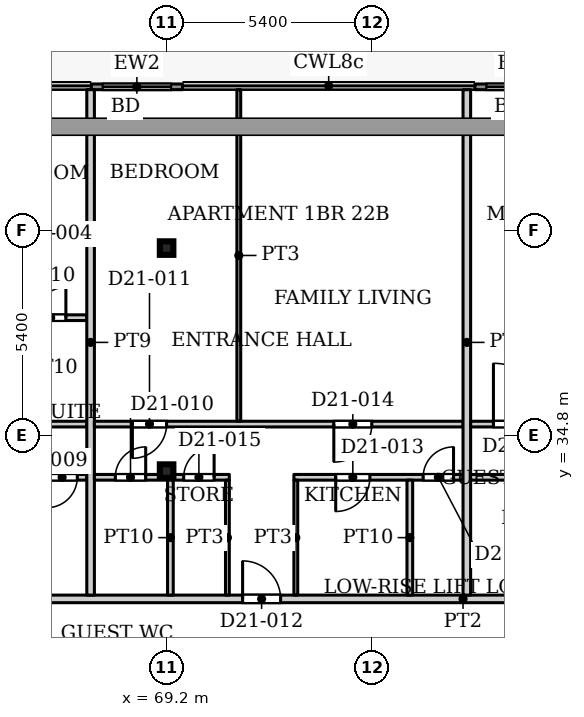
"""IFC4 building model, lengths in metres.
Left out: names, types, materials, properties, quantities, classifications, styles, units other than length and angle.
Written with IfcOpenShell. Run it as: python <this file> out.ifc"""

import sys

from ifc_helpers import new_model, si_unit, direction, frame, frame_2d, origin, origin_2d, place, context, subcontext, project, spatial, rectangle, hollow_rectangle, extrude, source, transform, mapped, element, fill, save


model = new_model("IFC4")
c1 = context("Model", 3, precision=1e-05, world=origin(), true_north=direction((0.0, 1.0)))
c2 = subcontext(c1, "Body", "Model", "MODEL_VIEW")
j1 = project(units=[si_unit("LENGTHUNIT", "METRE"), si_unit("PLANEANGLEUNIT", "RADIAN")], contexts=[c1])
p1 = place(None, origin())
s1 = spatial("IfcSite", under=j1, at=p1, CompositionType="ELEMENT")
p2 = place(p1, origin())
s2 = spatial("IfcBuilding", under=s1, at=p2, CompositionType="ELEMENT")
p3 = place(p2, frame((0.0, 0.0, 98.0)))
s3 = spatial("IfcBuildingStorey", under=s2, at=p3, CompositionType="ELEMENT", Elevation=98.0)
for number, where, z_axis, x_axis in (
    (1, (69.2, 33.863, 0.0), (0.0, 0.0, 1.0), (1.0, 0.0, 0.0)),
    (2, (69.2, 39.732, 0.0), (0.0, 0.0, 1.0), (1.0, 0.0, 0.0)),
):
    element("IfcColumn", number, at=place(p3, frame(where, z_axis=z_axis, x_axis=x_axis)), inside=s3, PredefinedType="COLUMN", context=c2, shape_type="SweptSolid", body=[
        extrude(hollow_rectangle(XDim=0.356, YDim=0.356, WallThickness=0.016, InnerFilletRadius=0.016, OuterFilletRadius=0.032, at=origin_2d()), origin(), (0.0, 0.0, 1.0), 3.9),
    ])
p4 = place(p3, frame((67.218, 43.975, 0.0), z_axis=(0.0, 0.0, 1.0), x_axis=(1.0, 0.0, 0.0)))
e3 = element("IfcWall", 3, at=p4, inside=s3, PredefinedType="SOLIDWALL", context=c2, shape_type="SweptSolid", body=[
    extrude(rectangle(XDim=2.4, YDim=0.15, at=frame_2d((1.2, 0.0))), origin(), (0.0, 0.0, 1.0), 3.75),
])
p5 = place(p4, frame((0.3, 0.0, 0.0)))
e4 = element("IfcOpeningElement", 4, at=p5, cuts=e3, PredefinedType="OPENING", context=c2, shape_type="SweptSolid", body=[
    extrude(rectangle(XDim=1.8, YDim=2.4, at=frame_2d((0.9, 1.2))), frame((0.0, 0.085, 0.0), z_axis=(0.0, -1.0, 0.0), x_axis=(1.0, 0.0, 0.0)), (0.0, 0.0, 1.0), 0.17),
])
p6 = place(p3, frame((77.312, 43.975, 0.0), z_axis=(0.0, 0.0, 1.0), x_axis=(1.0, 0.0, 0.0)))
e5 = element("IfcWall", 5, at=p6, inside=s3, PredefinedType="SOLIDWALL", context=c2, shape_type="SweptSolid", body=[
    extrude(rectangle(XDim=2.4, YDim=0.15, at=frame_2d((1.2, 0.0))), origin(), (0.0, 0.0, 1.0), 3.75),
])
p7 = place(p6, frame((0.3, 0.0, 0.0)))
e6 = element("IfcOpeningElement", 6, at=p7, cuts=e5, PredefinedType="OPENING", context=c2, shape_type="SweptSolid", body=[
    extrude(rectangle(XDim=1.8, YDim=2.4, at=frame_2d((0.9, 1.2))), frame((0.0, 0.085, 0.0), z_axis=(0.0, -1.0, 0.0), x_axis=(1.0, 0.0, 0.0)), (0.0, 0.0, 1.0), 0.17),
])
p8 = place(p3, frame((55.9, 30.5, 0.0), z_axis=(0.0, 0.0, 1.0), x_axis=(1.0, 0.0, 0.0)))
e7 = element("IfcWall", 7, at=p8, inside=s3, PredefinedType="PARTITIONING", context=c2, shape_type="SweptSolid", body=[
    extrude(rectangle(XDim=42.2, YDim=0.2, at=frame_2d((21.1, 0.0))), origin(), (0.0, 0.0, 1.0), 3.6),
])
p9 = place(p8, frame((2.7, 0.0, 0.0)))
e8 = element("IfcOpeningElement", 8, at=p9, cuts=e7, PredefinedType="OPENING", context=c2, shape_type="SweptSolid", body=[
    extrude(rectangle(XDim=1.0, YDim=2.1, at=frame_2d((0.5, 1.05))), frame((0.0, 0.11, 0.0), z_axis=(0.0, -1.0, 0.0), x_axis=(1.0, 0.0, 0.0)), (0.0, 0.0, 1.0), 0.22),
])
p10 = place(p8, frame((15.3, 0.0, 0.0)))
e9 = element("IfcOpeningElement", 9, at=p10, cuts=e7, PredefinedType="OPENING", context=c2, shape_type="SweptSolid", body=[
    extrude(rectangle(XDim=1.0, YDim=2.1, at=frame_2d((0.5, 1.05))), frame((0.0, 0.11, 0.0), z_axis=(0.0, -1.0, 0.0), x_axis=(1.0, 0.0, 0.0)), (0.0, 0.0, 1.0), 0.22),
])
p11 = place(p8, frame((33.3, 0.0, 0.0)))
e10 = element("IfcOpeningElement", 10, at=p11, cuts=e7, PredefinedType="OPENING", context=c2, shape_type="SweptSolid", body=[
    extrude(rectangle(XDim=1.0, YDim=2.1, at=frame_2d((0.5, 1.05))), frame((0.0, 0.11, 0.0), z_axis=(0.0, -1.0, 0.0), x_axis=(1.0, 0.0, 0.0)), (0.0, 0.0, 1.0), 0.22),
])
p12 = place(p3, frame((55.9, 35.1, 0.0), z_axis=(0.0, 0.0, 1.0), x_axis=(1.0, 0.0, 0.0)))
e11 = element("IfcWall", 11, at=p12, inside=s3, PredefinedType="PARTITIONING", context=c2, shape_type="SweptSolid", body=[
    extrude(rectangle(XDim=11.2, YDim=0.15, at=frame_2d((5.6, 0.0))), origin(), (0.0, 0.0, 1.0), 3.6),
])
p13 = place(p12, frame((1.4, 0.0, 0.0)))
e12 = element("IfcOpeningElement", 12, at=p13, cuts=e11, PredefinedType="OPENING", context=c2, shape_type="SweptSolid", body=[
    extrude(rectangle(XDim=0.9, YDim=2.1, at=frame_2d((0.45, 1.05))), frame((0.0, 0.085, 0.0), z_axis=(0.0, -1.0, 0.0), x_axis=(1.0, 0.0, 0.0)), (0.0, 0.0, 1.0), 0.17),
])
p14 = place(p12, frame((5.1, 0.0, 0.0)))
e13 = element("IfcOpeningElement", 13, at=p14, cuts=e11, PredefinedType="OPENING", context=c2, shape_type="SweptSolid", body=[
    extrude(rectangle(XDim=1.0, YDim=2.1, at=frame_2d((0.5, 1.05))), frame((0.0, 0.085, 0.0), z_axis=(0.0, -1.0, 0.0), x_axis=(1.0, 0.0, 0.0)), (0.0, 0.0, 1.0), 0.17),
])
p15 = place(p12, frame((7.85, 0.0, 0.0)))
e14 = element("IfcOpeningElement", 14, at=p15, cuts=e11, PredefinedType="OPENING", context=c2, shape_type="SweptSolid", body=[
    extrude(rectangle(XDim=0.9, YDim=2.1, at=frame_2d((0.45, 1.05))), frame((0.0, 0.085, 0.0), z_axis=(0.0, -1.0, 0.0), x_axis=(1.0, 0.0, 0.0)), (0.0, 0.0, 1.0), 0.17),
])
p16 = place(p3, frame((59.95, 33.7, 0.0), z_axis=(0.0, 0.0, 1.0), x_axis=(1.0, 0.0, 0.0)))
e15 = element("IfcWall", 15, at=p16, inside=s3, PredefinedType="PARTITIONING", context=c2, shape_type="SweptSolid", body=[
    extrude(rectangle(XDim=7.15, YDim=0.15, at=frame_2d((3.575, 0.0))), origin(), (0.0, 0.0, 1.0), 3.6),
])
p17 = place(p16, frame((4.15, 0.0, 0.0)))
e16 = element("IfcOpeningElement", 16, at=p17, cuts=e15, PredefinedType="OPENING", context=c2, shape_type="SweptSolid", body=[
    extrude(rectangle(XDim=0.8, YDim=2.1, at=frame_2d((0.4, 1.05))), frame((0.0, 0.085, 0.0), z_axis=(0.0, -1.0, 0.0), x_axis=(1.0, 0.0, 0.0)), (0.0, 0.0, 1.0), 0.17),
])
p18 = place(p16, frame((1.25, 0.0, 0.0)))
e17 = element("IfcOpeningElement", 17, at=p18, cuts=e15, PredefinedType="OPENING", context=c2, shape_type="SweptSolid", body=[
    extrude(rectangle(XDim=0.9, YDim=2.1, at=frame_2d((0.45, 1.05))), frame((0.0, 0.085, 0.0), z_axis=(0.0, -1.0, 0.0), x_axis=(1.0, 0.0, 0.0)), (0.0, 0.0, 1.0), 0.17),
])
p19 = place(p16, frame((6.1, 0.0, 0.0)))
e18 = element("IfcOpeningElement", 18, at=p19, cuts=e15, PredefinedType="OPENING", context=c2, shape_type="SweptSolid", body=[
    extrude(rectangle(XDim=0.8, YDim=2.1, at=frame_2d((0.4, 1.05))), frame((0.0, 0.085, 0.0), z_axis=(0.0, -1.0, 0.0), x_axis=(1.0, 0.0, 0.0)), (0.0, 0.0, 1.0), 0.17),
])
p20 = place(p3, frame((65.175, 37.9, 0.0), z_axis=(0.0, 0.0, 1.0), x_axis=(1.0, 0.0, 0.0)))
e19 = element("IfcWall", 19, at=p20, inside=s3, PredefinedType="PARTITIONING", context=c2, shape_type="SweptSolid", body=[
    extrude(rectangle(XDim=1.925, YDim=0.15, at=frame_2d((0.962, 0.0))), origin(), (0.0, 0.0, 1.0), 3.6),
])
p21 = place(p20, frame((0.575, 0.0, 0.0)))
e20 = element("IfcOpeningElement", 20, at=p21, cuts=e19, PredefinedType="OPENING", context=c2, shape_type="SweptSolid", body=[
    extrude(rectangle(XDim=0.8, YDim=2.1, at=frame_2d((0.4, 1.05))), frame((0.0, 0.085, 0.0), z_axis=(0.0, -1.0, 0.0), x_axis=(1.0, 0.0, 0.0)), (0.0, 0.0, 1.0), 0.17),
])
p22 = place(p3, frame((67.2, 30.6, 0.0), z_axis=(0.0, 0.0, 1.0), x_axis=(0.0, 1.0, 0.0)))
e21 = element("IfcWall", 21, at=p22, inside=s3, PredefinedType="PARTITIONING", context=c2, shape_type="SweptSolid", body=[
    extrude(rectangle(XDim=13.3, YDim=0.2, at=frame_2d((6.65, 0.0))), origin(), (0.0, 0.0, 1.0), 3.6),
])
p23 = place(p3, frame((67.3, 33.7, 0.0), z_axis=(0.0, 0.0, 1.0), x_axis=(1.0, 0.0, 0.0)))
e22 = element("IfcWall", 22, at=p23, inside=s3, PredefinedType="PARTITIONING", context=c2, shape_type="SweptSolid", body=[
    extrude(rectangle(XDim=3.55, YDim=0.15, at=frame_2d((1.775, 0.0))), origin(), (0.0, 0.0, 1.0), 3.6),
])
p24 = place(p23, frame((0.55, 0.0, 0.0)))
e23 = element("IfcOpeningElement", 23, at=p24, cuts=e22, PredefinedType="OPENING", context=c2, shape_type="SweptSolid", body=[
    extrude(rectangle(XDim=0.8, YDim=2.1, at=frame_2d((0.4, 1.05))), frame((0.0, 0.085, 0.0), z_axis=(0.0, -1.0, 0.0), x_axis=(1.0, 0.0, 0.0)), (0.0, 0.0, 1.0), 0.17),
])
p25 = place(p23, frame((2.35, 0.0, 0.0)))
e24 = element("IfcOpeningElement", 24, at=p25, cuts=e22, PredefinedType="OPENING", context=c2, shape_type="SweptSolid", body=[
    extrude(rectangle(XDim=0.8, YDim=2.1, at=frame_2d((0.4, 1.05))), frame((0.0, 0.085, 0.0), z_axis=(0.0, -1.0, 0.0), x_axis=(1.0, 0.0, 0.0)), (0.0, 0.0, 1.0), 0.17),
])
p26 = place(p3, frame((67.3, 35.1, 0.0), z_axis=(0.0, 0.0, 1.0), x_axis=(1.0, 0.0, 0.0)))
e25 = element("IfcWall", 25, at=p26, inside=s3, PredefinedType="PARTITIONING", context=c2, shape_type="SweptSolid", body=[
    extrude(rectangle(XDim=9.7, YDim=0.15, at=frame_2d((4.85, 0.0))), origin(), (0.0, 0.0, 1.0), 3.6),
])
p27 = place(p26, frame((1.0, 0.0, 0.0)))
e26 = element("IfcOpeningElement", 26, at=p27, cuts=e25, PredefinedType="OPENING", context=c2, shape_type="SweptSolid", body=[
    extrude(rectangle(XDim=0.9, YDim=2.1, at=frame_2d((0.45, 1.05))), frame((0.0, 0.085, 0.0), z_axis=(0.0, -1.0, 0.0), x_axis=(1.0, 0.0, 0.0)), (0.0, 0.0, 1.0), 0.17),
])
p28 = place(p26, frame((6.3, 0.0, 0.0)))
e27 = element("IfcOpeningElement", 27, at=p28, cuts=e25, PredefinedType="OPENING", context=c2, shape_type="SweptSolid", body=[
    extrude(rectangle(XDim=1.0, YDim=2.1, at=frame_2d((0.5, 1.05))), frame((0.0, 0.085, 0.0), z_axis=(0.0, -1.0, 0.0), x_axis=(1.0, 0.0, 0.0)), (0.0, 0.0, 1.0), 0.17),
])
p29 = place(p3, frame((69.3, 30.6, 0.0), z_axis=(0.0, 0.0, 1.0), x_axis=(0.0, 1.0, 0.0)))
e28 = element("IfcWall", 28, at=p29, inside=s3, PredefinedType="PARTITIONING", context=c2, shape_type="SweptSolid", body=[
    extrude(rectangle(XDim=3.025, YDim=0.15, at=frame_2d((1.512, 0.0))), origin(), (0.0, 0.0, 1.0), 3.6),
])
p30 = place(p3, frame((70.8, 30.6, 0.0), z_axis=(0.0, 0.0, 1.0), x_axis=(0.0, 1.0, 0.0)))
e29 = element("IfcWall", 29, at=p30, inside=s3, PredefinedType="PARTITIONING", context=c2, shape_type="SweptSolid", body=[
    extrude(rectangle(XDim=3.025, YDim=0.1, at=frame_2d((1.512, 0.0))), origin(), (0.0, 0.0, 1.0), 3.6),
])
p31 = place(p3, frame((71.1, 35.175, 0.0), z_axis=(0.0, 0.0, 1.0), x_axis=(0.0, 1.0, 0.0)))
e30 = element("IfcWall", 30, at=p31, inside=s3, PredefinedType="PARTITIONING", context=c2, shape_type="SweptSolid", body=[
    extrude(rectangle(XDim=8.725, YDim=0.1, at=frame_2d((4.362, 0.0))), origin(), (0.0, 0.0, 1.0), 3.6),
])
p32 = place(p3, frame((72.55, 33.7, 0.0), z_axis=(0.0, 0.0, 1.0), x_axis=(1.0, 0.0, 0.0)))
e31 = element("IfcWall", 31, at=p32, inside=s3, PredefinedType="PARTITIONING", context=c2, shape_type="SweptSolid", body=[
    extrude(rectangle(XDim=4.45, YDim=0.15, at=frame_2d((2.225, 0.0))), origin(), (0.0, 0.0, 1.0), 3.6),
])
p33 = place(p32, frame((1.1, 0.0, 0.0)))
e32 = element("IfcOpeningElement", 32, at=p33, cuts=e31, PredefinedType="OPENING", context=c2, shape_type="SweptSolid", body=[
    extrude(rectangle(XDim=0.9, YDim=2.1, at=frame_2d((0.45, 1.05))), frame((0.0, 0.085, 0.0), z_axis=(0.0, -1.0, 0.0), x_axis=(1.0, 0.0, 0.0)), (0.0, 0.0, 1.0), 0.17),
])
p34 = place(p32, frame((3.4, 0.0, 0.0)))
e33 = element("IfcOpeningElement", 33, at=p34, cuts=e31, PredefinedType="OPENING", context=c2, shape_type="SweptSolid", body=[
    extrude(rectangle(XDim=0.8, YDim=2.1, at=frame_2d((0.4, 1.05))), frame((0.0, 0.085, 0.0), z_axis=(0.0, -1.0, 0.0), x_axis=(1.0, 0.0, 0.0)), (0.0, 0.0, 1.0), 0.17),
])
p35 = place(p3, frame((72.6, 30.6, 0.0), z_axis=(0.0, 0.0, 1.0), x_axis=(0.0, 1.0, 0.0)))
e34 = element("IfcWall", 34, at=p35, inside=s3, PredefinedType="PARTITIONING", context=c2, shape_type="SweptSolid", body=[
    extrude(rectangle(XDim=3.025, YDim=0.1, at=frame_2d((1.512, 0.0))), origin(), (0.0, 0.0, 1.0), 3.6),
])
p36 = place(p3, frame((75.6, 30.6, 0.0), z_axis=(0.0, 0.0, 1.0), x_axis=(0.0, 1.0, 0.0)))
e35 = element("IfcWall", 35, at=p36, inside=s3, PredefinedType="PARTITIONING", context=c2, shape_type="SweptSolid", body=[
    extrude(rectangle(XDim=3.025, YDim=0.15, at=frame_2d((1.512, 0.0))), origin(), (0.0, 0.0, 1.0), 3.6),
])
p37 = place(p3, frame((77.1, 30.6, 0.0), z_axis=(0.0, 0.0, 1.0), x_axis=(0.0, 1.0, 0.0)))
e36 = element("IfcWall", 36, at=p37, inside=s3, PredefinedType="PARTITIONING", context=c2, shape_type="SweptSolid", body=[
    extrude(rectangle(XDim=13.3, YDim=0.2, at=frame_2d((6.65, 0.0))), origin(), (0.0, 0.0, 1.0), 3.6),
])
p38 = place(p3, frame((77.2, 33.7, 0.0), z_axis=(0.0, 0.0, 1.0), x_axis=(1.0, 0.0, 0.0)))
e37 = element("IfcWall", 37, at=p38, inside=s3, PredefinedType="PARTITIONING", context=c2, shape_type="SweptSolid", body=[
    extrude(rectangle(XDim=11.375, YDim=0.15, at=frame_2d((5.688, 0.0))), origin(), (0.0, 0.0, 1.0), 3.6),
])
p39 = place(p38, frame((9.4, 0.0, 0.0)))
e38 = element("IfcOpeningElement", 38, at=p39, cuts=e37, PredefinedType="OPENING", context=c2, shape_type="SweptSolid", body=[
    extrude(rectangle(XDim=0.8, YDim=2.1, at=frame_2d((0.4, 1.05))), frame((0.0, 0.085, 0.0), z_axis=(0.0, -1.0, 0.0), x_axis=(1.0, 0.0, 0.0)), (0.0, 0.0, 1.0), 0.17),
])
p40 = place(p38, frame((1.5, 0.0, 0.0)))
e39 = element("IfcOpeningElement", 39, at=p40, cuts=e37, PredefinedType="OPENING", context=c2, shape_type="SweptSolid", body=[
    extrude(rectangle(XDim=0.8, YDim=2.1, at=frame_2d((0.4, 1.05))), frame((0.0, 0.085, 0.0), z_axis=(0.0, -1.0, 0.0), x_axis=(1.0, 0.0, 0.0)), (0.0, 0.0, 1.0), 0.17),
])
p41 = place(p3, frame((77.2, 35.1, 0.0), z_axis=(0.0, 0.0, 1.0), x_axis=(1.0, 0.0, 0.0)))
e40 = element("IfcWall", 40, at=p41, inside=s3, PredefinedType="PARTITIONING", context=c2, shape_type="SweptSolid", body=[
    extrude(rectangle(XDim=22.7, YDim=0.15, at=frame_2d((11.35, 0.0))), origin(), (0.0, 0.0, 1.0), 3.6),
])
p42 = place(p41, frame((4.4, 0.0, 0.0)))
e41 = element("IfcOpeningElement", 41, at=p42, cuts=e40, PredefinedType="OPENING", context=c2, shape_type="SweptSolid", body=[
    extrude(rectangle(XDim=0.9, YDim=2.1, at=frame_2d((0.45, 1.05))), frame((0.0, 0.085, 0.0), z_axis=(0.0, -1.0, 0.0), x_axis=(1.0, 0.0, 0.0)), (0.0, 0.0, 1.0), 0.17),
])
p43 = place(p41, frame((8.3, 0.0, 0.0)))
e42 = element("IfcOpeningElement", 42, at=p43, cuts=e40, PredefinedType="OPENING", context=c2, shape_type="SweptSolid", body=[
    extrude(rectangle(XDim=0.9, YDim=2.1, at=frame_2d((0.45, 1.05))), frame((0.0, 0.085, 0.0), z_axis=(0.0, -1.0, 0.0), x_axis=(1.0, 0.0, 0.0)), (0.0, 0.0, 1.0), 0.17),
])
p44 = place(p41, frame((20.9, 0.0, 0.0)))
e43 = element("IfcOpeningElement", 43, at=p44, cuts=e40, PredefinedType="OPENING", context=c2, shape_type="SweptSolid", body=[
    extrude(rectangle(XDim=0.9, YDim=2.1, at=frame_2d((0.45, 1.05))), frame((0.0, 0.085, 0.0), z_axis=(0.0, -1.0, 0.0), x_axis=(1.0, 0.0, 0.0)), (0.0, 0.0, 1.0), 0.17),
])
p45 = place(p41, frame((17.4, 0.0, 0.0)))
e44 = element("IfcOpeningElement", 44, at=p45, cuts=e40, PredefinedType="OPENING", context=c2, shape_type="SweptSolid", body=[
    extrude(rectangle(XDim=1.0, YDim=2.1, at=frame_2d((0.5, 1.05))), frame((0.0, 0.085, 0.0), z_axis=(0.0, -1.0, 0.0), x_axis=(1.0, 0.0, 0.0)), (0.0, 0.0, 1.0), 0.17),
])
p46 = place(p41, frame((0.6, 0.0, 0.0)))
e45 = element("IfcOpeningElement", 45, at=p46, cuts=e40, PredefinedType="OPENING", context=c2, shape_type="SweptSolid", body=[
    extrude(rectangle(XDim=1.6, YDim=2.1, at=frame_2d((0.8, 1.05))), frame((0.0, 0.085, 0.0), z_axis=(0.0, -1.0, 0.0), x_axis=(1.0, 0.0, 0.0)), (0.0, 0.0, 1.0), 0.17),
])
p47 = place(p41, frame((11.75, 0.0, 0.0)))
e46 = element("IfcOpeningElement", 46, at=p47, cuts=e40, PredefinedType="OPENING", context=c2, shape_type="SweptSolid", body=[
    extrude(rectangle(XDim=0.9, YDim=2.1, at=frame_2d((0.45, 1.05))), frame((0.0, 0.085, 0.0), z_axis=(0.0, -1.0, 0.0), x_axis=(1.0, 0.0, 0.0)), (0.0, 0.0, 1.0), 0.17),
])
m1 = source(origin(), c2, "Body", "SweptSolid", [
    extrude(rectangle(XDim=1.8, YDim=2.4, at=frame_2d((0.9, 1.2))), frame((0.0, 0.025, 0.0), z_axis=(0.0, -1.0, 0.0), x_axis=(1.0, 0.0, 0.0)), (0.0, 0.0, 1.0), 0.05),
])
p48 = place(p5, origin())
e47 = element("IfcDoor", 47, at=p48, inside=s3, OperationType="SLIDING_TO_LEFT", PredefinedType="DOOR", context=c2, shape_type="MappedRepresentation", body=[
    mapped(m1, transform((0.0, 0.0, 0.0), x_axis=(1.0, 0.0, 0.0), y_axis=(0.0, 1.0, 0.0), z_axis=(0.0, 0.0, 1.0), scale=1.0)),
])
fill(e4, e47)
p49 = place(p7, origin())
e48 = element("IfcDoor", 48, at=p49, inside=s3, OperationType="SLIDING_TO_LEFT", PredefinedType="DOOR", context=c2, shape_type="MappedRepresentation", body=[
    mapped(m1, transform((0.0, 0.0, 0.0), x_axis=(1.0, 0.0, 0.0), y_axis=(0.0, 1.0, 0.0), z_axis=(0.0, 0.0, 1.0), scale=1.0)),
])
fill(e6, e48)
m2 = source(origin(), c2, "Body", "SweptSolid", [
    extrude(rectangle(XDim=0.8, YDim=2.1, at=frame_2d((0.4, 1.05))), frame((0.0, 0.025, 0.0), z_axis=(0.0, -1.0, 0.0), x_axis=(1.0, 0.0, 0.0)), (0.0, 0.0, 1.0), 0.05),
])
p50 = place(p21, origin())
e49 = element("IfcDoor", 49, at=p50, inside=s3, OperationType="SINGLE_SWING_LEFT", PredefinedType="DOOR", context=c2, shape_type="MappedRepresentation", body=[
    mapped(m2, transform((0.0, 0.0, 0.0), x_axis=(1.0, 0.0, 0.0), y_axis=(0.0, 1.0, 0.0), z_axis=(0.0, 0.0, 1.0), scale=1.0)),
])
fill(e20, e49)
p51 = place(p19, origin())
e50 = element("IfcDoor", 50, at=p51, inside=s3, OperationType="SINGLE_SWING_RIGHT", PredefinedType="DOOR", context=c2, shape_type="MappedRepresentation", body=[
    mapped(m2, transform((0.0, 0.0, 0.0), x_axis=(1.0, 0.0, 0.0), y_axis=(0.0, 1.0, 0.0), z_axis=(0.0, 0.0, 1.0), scale=1.0)),
])
fill(e18, e50)
p52 = place(p24, origin())
e51 = element("IfcDoor", 51, at=p52, inside=s3, OperationType="SINGLE_SWING_LEFT", PredefinedType="DOOR", context=c2, shape_type="MappedRepresentation", body=[
    mapped(m2, transform((0.0, 0.0, 0.0), x_axis=(1.0, 0.0, 0.0), y_axis=(0.0, 1.0, 0.0), z_axis=(0.0, 0.0, 1.0), scale=1.0)),
])
fill(e23, e51)
m3 = source(origin(), c2, "Body", "SweptSolid", [
    extrude(rectangle(XDim=0.9, YDim=2.1, at=frame_2d((0.45, 1.05))), frame((0.0, 0.025, 0.0), z_axis=(0.0, -1.0, 0.0), x_axis=(1.0, 0.0, 0.0)), (0.0, 0.0, 1.0), 0.05),
])
p53 = place(p27, origin())
e52 = element("IfcDoor", 52, at=p53, inside=s3, OperationType="SINGLE_SWING_RIGHT", PredefinedType="DOOR", context=c2, shape_type="MappedRepresentation", body=[
    mapped(m3, transform((0.0, 0.0, 0.0), x_axis=(1.0, 0.0, 0.0), y_axis=(0.0, 1.0, 0.0), z_axis=(0.0, 0.0, 1.0), scale=1.0)),
])
fill(e26, e52)
m4 = source(origin(), c2, "Body", "SweptSolid", [
    extrude(rectangle(XDim=1.0, YDim=2.1, at=frame_2d((0.5, 1.05))), frame((0.0, 0.025, 0.0), z_axis=(0.0, -1.0, 0.0), x_axis=(1.0, 0.0, 0.0)), (0.0, 0.0, 1.0), 0.05),
])
p54 = place(p10, origin())
e53 = element("IfcDoor", 53, at=p54, inside=s3, OperationType="SINGLE_SWING_LEFT", PredefinedType="DOOR", context=c2, shape_type="MappedRepresentation", body=[
    mapped(m4, transform((0.0, 0.0, 0.0), x_axis=(1.0, 0.0, 0.0), y_axis=(0.0, 1.0, 0.0), z_axis=(0.0, 0.0, 1.0), scale=1.0)),
])
fill(e9, e53)
p55 = place(p33, origin())
e54 = element("IfcDoor", 54, at=p55, inside=s3, OperationType="SINGLE_SWING_RIGHT", PredefinedType="DOOR", context=c2, shape_type="MappedRepresentation", body=[
    mapped(m3, transform((0.0, 0.0, 0.0), x_axis=(1.0, 0.0, 0.0), y_axis=(0.0, 1.0, 0.0), z_axis=(0.0, 0.0, 1.0), scale=1.0)),
])
fill(e32, e54)
m5 = source(origin(), c2, "Body", "SweptSolid", [
    extrude(rectangle(XDim=1.0, YDim=2.1, at=frame_2d((0.5, 1.05))), frame((0.0, 0.025, 0.0), z_axis=(0.0, -1.0, 0.0), x_axis=(1.0, 0.0, 0.0)), (0.0, 0.0, 1.0), 0.05),
])
p56 = place(p28, origin())
e55 = element("IfcDoor", 55, at=p56, inside=s3, OperationType="SINGLE_SWING_RIGHT", PredefinedType="DOOR", context=c2, shape_type="MappedRepresentation", body=[
    mapped(m5, transform((0.0, 0.0, 0.0), x_axis=(1.0, 0.0, 0.0), y_axis=(0.0, 1.0, 0.0), z_axis=(0.0, 0.0, 1.0), scale=1.0)),
])
fill(e27, e55)
p57 = place(p25, origin())
e56 = element("IfcDoor", 56, at=p57, inside=s3, OperationType="SINGLE_SWING_LEFT", PredefinedType="DOOR", context=c2, shape_type="MappedRepresentation", body=[
    mapped(m2, transform((0.0, 0.0, 0.0), x_axis=(1.0, 0.0, 0.0), y_axis=(0.0, 1.0, 0.0), z_axis=(0.0, 0.0, 1.0), scale=1.0)),
])
fill(e24, e56)
p58 = place(p34, origin())
e57 = element("IfcDoor", 57, at=p58, inside=s3, OperationType="SINGLE_SWING_LEFT", PredefinedType="DOOR", context=c2, shape_type="MappedRepresentation", body=[
    mapped(m2, transform((0.0, 0.0, 0.0), x_axis=(1.0, 0.0, 0.0), y_axis=(0.0, 1.0, 0.0), z_axis=(0.0, 0.0, 1.0), scale=1.0)),
])
fill(e33, e57)
m6 = source(origin(), c2, "Body", "SweptSolid", [
    extrude(rectangle(XDim=1.6, YDim=2.1, at=frame_2d((0.8, 1.05))), frame((0.0, 0.025, 0.0), z_axis=(0.0, -1.0, 0.0), x_axis=(1.0, 0.0, 0.0)), (0.0, 0.0, 1.0), 0.05),
])
p59 = place(p46, origin())
e58 = element("IfcDoor", 58, at=p59, inside=s3, OperationType="DOUBLE_DOOR_SINGLE_SWING", PredefinedType="DOOR", context=c2, shape_type="MappedRepresentation", body=[
    mapped(m6, transform((0.0, 0.0, 0.0), x_axis=(1.0, 0.0, 0.0), y_axis=(0.0, 1.0, 0.0), z_axis=(0.0, 0.0, 1.0), scale=1.0)),
])
fill(e45, e58)
save(model, sys.argv[1])
